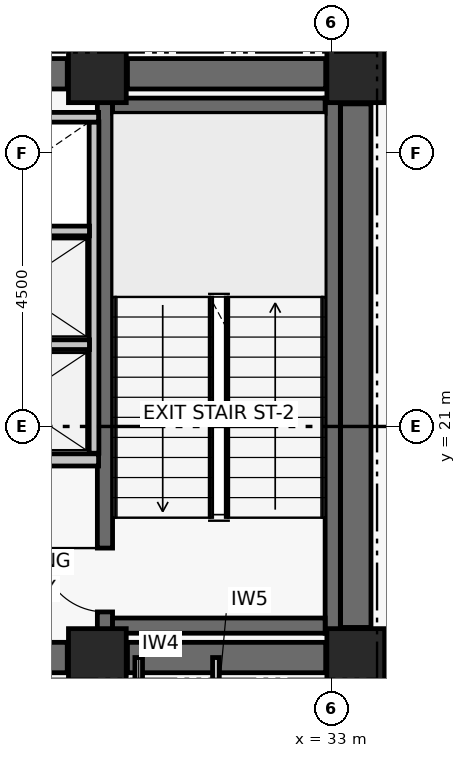
"""IFC4 building model, lengths in metres.
Left out: names, types, materials, properties, quantities, classifications, styles, units other than length and angle.
Written with IfcOpenShell. Run it as: python <this file> out.ifc"""

import sys

from ifc_helpers import new_model, si_unit, direction, frame, frame_2d, origin, origin_2d, place, context, subcontext, project, spatial, rectangle, extrude, element, fill, save


model = new_model("IFC4")
c1 = context("Model", 3, precision=1e-05, world=origin(), true_north=direction((0.0, 1.0)))
c2 = subcontext(c1, "Body", "Model", "MODEL_VIEW")
j1 = project(units=[si_unit("LENGTHUNIT", "METRE"), si_unit("PLANEANGLEUNIT", "RADIAN")], contexts=[c1])
p1 = place(None, origin())
s1 = spatial("IfcSite", under=j1, at=p1, CompositionType="ELEMENT")
p2 = place(p1, origin())
s2 = spatial("IfcBuilding", under=s1, at=p2, CompositionType="ELEMENT")
p3 = place(p2, frame((0.0, 0.0, 206.4)))
s3 = spatial("IfcBuildingStorey", under=s2, at=p3, CompositionType="ELEMENT", Elevation=206.4)
for number, where, z_axis, x_axis in (
    (1, (29.15, 17.2, 0.0), (0.0, 0.0, 1.0), (1.0, 0.0, 0.0)),
    (2, (33.4, 17.2, 0.0), (0.0, 0.0, 1.0), (1.0, 0.0, 0.0)),
    (3, (29.15, 26.8, 0.0), (0.0, 0.0, 1.0), (1.0, 0.0, 0.0)),
    (4, (33.4, 26.8, 0.0), (0.0, 0.0, 1.0), (1.0, 0.0, 0.0)),
):
    element("IfcColumn", number, at=place(p3, frame(where, z_axis=z_axis, x_axis=x_axis)), inside=s3, PredefinedType="COLUMN", context=c2, shape_type="SweptSolid", body=[
        extrude(rectangle(XDim=0.95, YDim=0.95, at=origin_2d()), origin(), (0.0, 0.0, 1.0), 3.72),
    ])
p4 = place(p3, frame((26.85, 17.2, 0.0), z_axis=(0.0, 0.0, 1.0), x_axis=(1.0, 0.0, 0.0)))
e5 = element("IfcWall", 5, at=p4, inside=s3, PredefinedType="SHEAR", context=c2, shape_type="SweptSolid", body=[
    extrude(rectangle(XDim=1.805, YDim=0.5, at=frame_2d((0.902, 0.0))), origin(), (0.0, 0.0, 1.0), 3.5),
])
p5 = place(p3, frame((29.645, 17.2, 0.0), z_axis=(0.0, 0.0, 1.0), x_axis=(1.0, 0.0, 0.0)))
e6 = element("IfcWall", 6, at=p5, inside=s3, PredefinedType="SHEAR", context=c2, shape_type="SweptSolid", body=[
    extrude(rectangle(XDim=3.26, YDim=0.5, at=frame_2d((1.63, 0.0))), origin(), (0.0, 0.0, 1.0), 3.5),
])
p6 = place(p3, frame((26.85, 26.8, 0.0), z_axis=(0.0, 0.0, 1.0), x_axis=(1.0, 0.0, 0.0)))
e7 = element("IfcWall", 7, at=p6, inside=s3, PredefinedType="SHEAR", context=c2, shape_type="SweptSolid", body=[
    extrude(rectangle(XDim=1.805, YDim=0.5, at=frame_2d((0.902, 0.0))), origin(), (0.0, 0.0, 1.0), 3.5),
])
p7 = place(p3, frame((29.645, 26.8, 0.0), z_axis=(0.0, 0.0, 1.0), x_axis=(1.0, 0.0, 0.0)))
e8 = element("IfcWall", 8, at=p7, inside=s3, PredefinedType="SHEAR", context=c2, shape_type="SweptSolid", body=[
    extrude(rectangle(XDim=3.26, YDim=0.5, at=frame_2d((1.63, 0.0))), origin(), (0.0, 0.0, 1.0), 3.5),
])
p8 = place(p3, frame((33.4, 17.695, 0.0), z_axis=(0.0, 0.0, 1.0), x_axis=(0.0, 1.0, 0.0)))
e9 = element("IfcWall", 9, at=p8, inside=s3, PredefinedType="SHEAR", context=c2, shape_type="SweptSolid", body=[
    extrude(rectangle(XDim=8.61, YDim=0.5, at=frame_2d((4.305, 0.0))), origin(), (0.0, 0.0, 1.0), 3.5),
])
p9 = place(p3, frame((29.275, 17.6, 0.0), z_axis=(0.0, 0.0, 1.0), x_axis=(0.0, 1.0, 0.0)))
e10 = element("IfcWall", 10, at=p9, inside=s3, PredefinedType="SHEAR", context=c2, shape_type="SweptSolid", body=[
    extrude(rectangle(XDim=8.8, YDim=0.25, at=frame_2d((4.4, 0.0))), origin(), (0.0, 0.0, 1.0), 3.5),
])
p10 = place(p9, frame((0.35, 0.0, 0.0)))
e11 = element("IfcOpeningElement", 11, at=p10, cuts=e10, PredefinedType="OPENING", context=c2, shape_type="SweptSolid", body=[
    extrude(rectangle(XDim=1.05, YDim=2.08, at=frame_2d((0.525, 1.04))), frame((0.0, 0.135, 0.0), z_axis=(0.0, -1.0, 0.0), x_axis=(1.0, 0.0, 0.0)), (0.0, 0.0, 1.0), 0.27),
])
p11 = place(p3, frame((33.021, 17.6, 0.0), z_axis=(0.0, 0.0, 1.0), x_axis=(0.0, 1.0, 0.0)))
e12 = element("IfcWall", 12, at=p11, inside=s3, PredefinedType="SHEAR", context=c2, shape_type="SweptSolid", body=[
    extrude(rectangle(XDim=8.8, YDim=0.25, at=frame_2d((4.4, 0.0))), origin(), (0.0, 0.0, 1.0), 3.5),
])
for number, where, z_axis, x_axis in (
    (13, (29.4, 17.725, 0.0), (0.0, 0.0, 1.0), (1.0, 0.0, 0.0)),
    (14, (29.4, 26.275, 0.0), (0.0, 0.0, 1.0), (1.0, 0.0, 0.0)),
):
    element("IfcWall", number, at=place(p3, frame(where, z_axis=z_axis, x_axis=x_axis)), inside=s3, PredefinedType="SHEAR", context=c2, shape_type="SweptSolid", body=[
        extrude(rectangle(XDim=3.496, YDim=0.25, at=frame_2d((1.748, 0.0))), origin(), (0.0, 0.0, 1.0), 3.5),
    ])
p12 = place(p3, frame((26.37, 20.45, 0.0), z_axis=(0.0, 0.0, 1.0), x_axis=(1.0, 0.0, 0.0)))
e15 = element("IfcWall", 15, at=p12, inside=s3, PredefinedType="PARTITIONING", context=c2, shape_type="SweptSolid", body=[
    extrude(rectangle(XDim=2.8, YDim=0.2, at=frame_2d((1.4, 0.0))), origin(), (0.0, 0.0, 1.0), 3.5),
])
p13 = place(p12, frame((0.78, 0.0, 0.0)))
e16 = element("IfcOpeningElement", 16, at=p13, cuts=e15, PredefinedType="OPENING", context=c2, shape_type="SweptSolid", body=[
    extrude(rectangle(XDim=1.1, YDim=2.08, at=frame_2d((0.55, 1.04))), frame((0.0, 0.11, 0.0), z_axis=(0.0, -1.0, 0.0), x_axis=(1.0, 0.0, 0.0)), (0.0, 0.0, 1.0), 0.22),
])
p14 = place(p3, frame((29.095, 20.56, 0.0), z_axis=(0.0, 0.0, 1.0), x_axis=(0.0, 1.0, 0.0)))
e17 = element("IfcWall", 17, at=p14, inside=s3, PredefinedType="PARTITIONING", context=c2, shape_type="SweptSolid", body=[
    extrude(rectangle(XDim=5.45, YDim=0.16, at=frame_2d((2.725, 0.0))), origin(), (0.0, 0.0, 1.0), 3.5),
])
p15 = place(p3, frame((26.37, 22.345, 0.0), z_axis=(0.0, 0.0, 1.0), x_axis=(1.0, 0.0, 0.0)))
e18 = element("IfcWall", 18, at=p15, inside=s3, PredefinedType="PARTITIONING", context=c2, shape_type="SweptSolid", body=[
    extrude(rectangle(XDim=2.65, YDim=0.16, at=frame_2d((1.325, 0.0))), origin(), (0.0, 0.0, 1.0), 3.5),
])
p16 = place(p3, frame((26.53, 24.215, 0.0), z_axis=(0.0, 0.0, 1.0), x_axis=(1.0, 0.0, 0.0)))
e19 = element("IfcWall", 19, at=p16, inside=s3, PredefinedType="PARTITIONING", context=c2, shape_type="SweptSolid", body=[
    extrude(rectangle(XDim=2.49, YDim=0.16, at=frame_2d((1.245, 0.0))), origin(), (0.0, 0.0, 1.0), 3.5),
])
p17 = place(p3, frame((26.34, 26.085, 0.0), z_axis=(0.0, 0.0, 1.0), x_axis=(1.0, 0.0, 0.0)))
e20 = element("IfcWall", 20, at=p17, inside=s3, PredefinedType="PARTITIONING", context=c2, shape_type="SweptSolid", body=[
    extrude(rectangle(XDim=2.83, YDim=0.16, at=frame_2d((1.415, 0.0))), origin(), (0.0, 0.0, 1.0), 3.5),
])
p18 = place(p3, frame((29.83, 14.95, 0.0), z_axis=(0.0, 0.0, 1.0), x_axis=(0.0, 1.0, 0.0)))
e21 = element("IfcWall", 21, at=p18, inside=s3, PredefinedType="PARTITIONING", context=c2, shape_type="SweptSolid", body=[
    extrude(rectangle(XDim=2.25, YDim=0.125, at=frame_2d((1.125, 0.0))), origin(), (0.0, 0.0, 1.0), 2.63),
])
p19 = place(p3, frame((31.1, 14.95, 0.0), z_axis=(0.0, 0.0, 1.0), x_axis=(0.0, 1.0, 0.0)))
e22 = element("IfcWall", 22, at=p19, inside=s3, PredefinedType="PARTITIONING", context=c2, shape_type="SweptSolid", body=[
    extrude(rectangle(XDim=2.25, YDim=0.11, at=frame_2d((1.125, 0.0))), origin(), (0.0, 0.0, 1.0), 2.63),
])
p20 = place(p10, origin())
e23 = element("IfcDoor", 23, at=p20, inside=s3, OperationType="SINGLE_SWING_RIGHT", PredefinedType="DOOR", context=c2, shape_type="SweptSolid", body=[
    extrude(rectangle(XDim=1.05, YDim=2.08, at=frame_2d((0.525, 1.04))), frame((0.0, 0.025, 0.0), z_axis=(0.0, -1.0, 0.0), x_axis=(1.0, 0.0, 0.0)), (0.0, 0.0, 1.0), 0.05),
])
fill(e11, e23)
save(model, sys.argv[1])
